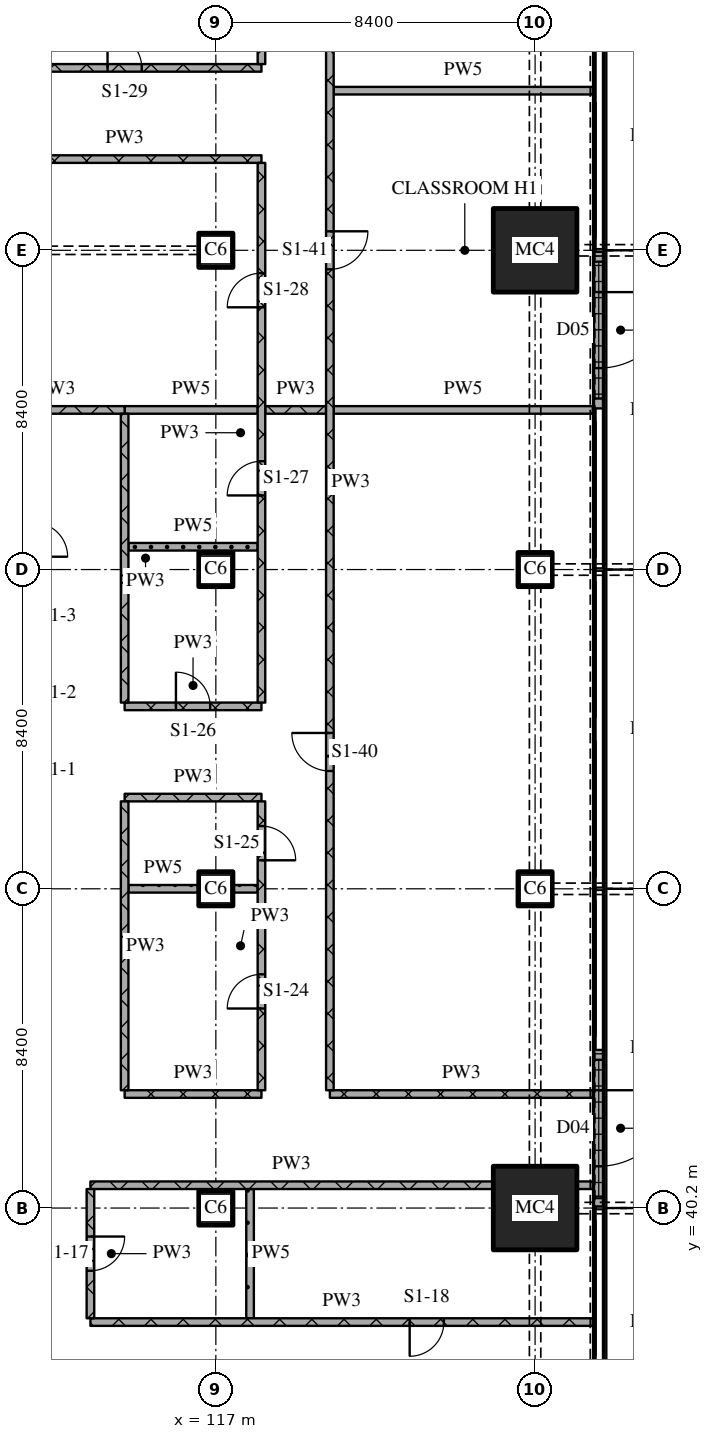
"""IFC4 building model, lengths in metres.
Left out: names, types, materials, properties, quantities, classifications, styles, units other than length and angle.
Written with IfcOpenShell. Run it as: python <this file> out.ifc"""

import sys

from ifc_helpers import new_model, si_unit, direction, frame, frame_2d, origin, origin_2d, place, context, subcontext, project, spatial, rectangle, extrude, element, fill, save


model = new_model("IFC4")
c1 = context("Model", 3, precision=1e-05, world=origin(), true_north=direction((0.0, 1.0)))
c2 = subcontext(c1, "Body", "Model", "MODEL_VIEW")
j1 = project(units=[si_unit("LENGTHUNIT", "METRE"), si_unit("PLANEANGLEUNIT", "RADIAN")], contexts=[c1])
p1 = place(None, origin())
s1 = spatial("IfcSite", under=j1, at=p1, CompositionType="ELEMENT")
p2 = place(p1, origin())
s2 = spatial("IfcBuilding", under=s1, at=p2, CompositionType="ELEMENT")
p3 = place(p2, frame((0.0, 0.0, 19.2)))
s3 = spatial("IfcBuildingStorey", under=s2, at=p3, CompositionType="ELEMENT", Elevation=19.2)
for number, where, z_axis, x_axis in (
    (1, (117.0, 40.2, 0.0), (0.0, 0.0, 1.0), (1.0, 0.0, 0.0)),
    (2, (117.0, 48.6, 0.0), (0.0, 0.0, 1.0), (1.0, 0.0, 0.0)),
    (3, (117.0, 57.0, 0.0), (0.0, 0.0, 1.0), (1.0, 0.0, 0.0)),
    (4, (117.0, 65.4, 0.0), (0.0, 0.0, 1.0), (1.0, 0.0, 0.0)),
):
    element("IfcColumn", number, at=place(p3, frame(where, z_axis=z_axis, x_axis=x_axis)), inside=s3, PredefinedType="COLUMN", context=c2, shape_type="SweptSolid", body=[
        extrude(rectangle(XDim=0.9, YDim=0.9, at=origin_2d()), origin(), (0.0, 0.0, 1.0), 4.5),
    ])
p4 = place(p3, frame((125.4, 40.2, 0.0), z_axis=(0.0, 0.0, 1.0), x_axis=(1.0, 0.0, 0.0)))
e5 = element("IfcColumn", 5, at=p4, inside=s3, PredefinedType="COLUMN", context=c2, shape_type="SweptSolid", body=[
    extrude(rectangle(XDim=2.2, YDim=2.2, at=origin_2d()), origin(), (0.0, 0.0, 1.0), 4.5),
])
for number, where, z_axis, x_axis in (
    (6, (125.4, 48.6, 0.0), (0.0, 0.0, 1.0), (1.0, 0.0, 0.0)),
    (7, (125.4, 57.0, 0.0), (0.0, 0.0, 1.0), (1.0, 0.0, 0.0)),
):
    element("IfcColumn", number, at=place(p3, frame(where, z_axis=z_axis, x_axis=x_axis)), inside=s3, PredefinedType="COLUMN", context=c2, shape_type="SweptSolid", body=[
        extrude(rectangle(XDim=0.9, YDim=0.9, at=origin_2d()), origin(), (0.0, 0.0, 1.0), 4.5),
    ])
p5 = place(p3, frame((125.4, 65.4, 0.0), z_axis=(0.0, 0.0, 1.0), x_axis=(1.0, 0.0, 0.0)))
e8 = element("IfcColumn", 8, at=p5, inside=s3, PredefinedType="COLUMN", context=c2, shape_type="SweptSolid", body=[
    extrude(rectangle(XDim=2.2, YDim=2.2, at=origin_2d()), origin(), (0.0, 0.0, 1.0), 4.5),
])
p6 = place(p3, frame((127.075, 44.36, 0.0), z_axis=(0.0, 0.0, 1.0), x_axis=(0.0, -1.0, 0.0)))
e9 = element("IfcWall", 9, at=p6, inside=s3, PredefinedType="SOLIDWALL", context=c2, shape_type="SweptSolid", body=[
    extrude(rectangle(XDim=4.12, YDim=0.25, at=frame_2d((2.06, 0.0))), origin(), (0.0, 0.0, 1.0), 4.2),
])
p7 = place(p6, frame((1.06, 0.0, 0.0)))
e10 = element("IfcOpeningElement", 10, at=p7, cuts=e9, PredefinedType="OPENING", context=c2, shape_type="SweptSolid", body=[
    extrude(rectangle(XDim=2.0, YDim=2.4, at=frame_2d((1.0, 1.2))), frame((0.0, 0.135, 0.0), z_axis=(0.0, -1.0, 0.0), x_axis=(1.0, 0.0, 0.0)), (0.0, 0.0, 1.0), 0.27),
])
p8 = place(p6, frame((0.26, 0.0, 2.7)))
e11 = element("IfcOpeningElement", 11, at=p8, cuts=e9, PredefinedType="OPENING", context=c2, shape_type="SweptSolid", body=[
    extrude(rectangle(XDim=3.6, YDim=1.1, at=frame_2d((1.8, 0.55))), frame((0.0, 0.135, 0.0), z_axis=(0.0, -1.0, 0.0), x_axis=(1.0, 0.0, 0.0)), (0.0, 0.0, 1.0), 0.27),
])
p9 = place(p3, frame((127.075, 65.36, 0.0), z_axis=(0.0, 0.0, 1.0), x_axis=(0.0, -1.0, 0.0)))
e12 = element("IfcWall", 12, at=p9, inside=s3, PredefinedType="SOLIDWALL", context=c2, shape_type="SweptSolid", body=[
    extrude(rectangle(XDim=4.12, YDim=0.25, at=frame_2d((2.06, 0.0))), origin(), (0.0, 0.0, 1.0), 4.2),
])
p10 = place(p9, frame((1.06, 0.0, 0.0)))
e13 = element("IfcOpeningElement", 13, at=p10, cuts=e12, PredefinedType="OPENING", context=c2, shape_type="SweptSolid", body=[
    extrude(rectangle(XDim=2.0, YDim=2.4, at=frame_2d((1.0, 1.2))), frame((0.0, 0.135, 0.0), z_axis=(0.0, -1.0, 0.0), x_axis=(1.0, 0.0, 0.0)), (0.0, 0.0, 1.0), 0.27),
])
p11 = place(p9, frame((0.26, 0.0, 2.7)))
e14 = element("IfcOpeningElement", 14, at=p11, cuts=e12, PredefinedType="OPENING", context=c2, shape_type="SweptSolid", body=[
    extrude(rectangle(XDim=3.6, YDim=1.1, at=frame_2d((1.8, 0.55))), frame((0.0, 0.135, 0.0), z_axis=(0.0, -1.0, 0.0), x_axis=(1.0, 0.0, 0.0)), (0.0, 0.0, 1.0), 0.27),
])
p12 = place(p3, frame((113.7, 37.2, 0.0), z_axis=(0.0, 0.0, 1.0), x_axis=(1.0, 0.0, 0.0)))
e15 = element("IfcWall", 15, at=p12, inside=s3, PredefinedType="PARTITIONING", context=c2, shape_type="SweptSolid", body=[
    extrude(rectangle(XDim=13.22, YDim=0.2, at=frame_2d((6.61, 0.0))), origin(), (0.0, 0.0, 1.0), 4.2),
])
p13 = place(p12, frame((8.4, 0.0, 0.0)))
e16 = element("IfcOpeningElement", 16, at=p13, cuts=e15, PredefinedType="OPENING", context=c2, shape_type="SweptSolid", body=[
    extrude(rectangle(XDim=0.9, YDim=2.1, at=frame_2d((0.45, 1.05))), frame((0.0, 0.11, 0.0), z_axis=(0.0, -1.0, 0.0), x_axis=(1.0, 0.0, 0.0)), (0.0, 0.0, 1.0), 0.22),
])
p14 = place(p3, frame((113.7, 40.8, 0.0), z_axis=(0.0, 0.0, 1.0), x_axis=(1.0, 0.0, 0.0)))
e17 = element("IfcWall", 17, at=p14, inside=s3, PredefinedType="PARTITIONING", context=c2, shape_type="SweptSolid", body=[
    extrude(rectangle(XDim=10.58, YDim=0.2, at=frame_2d((5.29, 0.0))), origin(), (0.0, 0.0, 1.0), 4.2),
])
p15 = place(p3, frame((126.52, 40.8, 0.0), z_axis=(0.0, 0.0, 1.0), x_axis=(1.0, 0.0, 0.0)))
e18 = element("IfcWall", 18, at=p15, inside=s3, PredefinedType="PARTITIONING", context=c2, shape_type="SweptSolid", body=[
    extrude(rectangle(XDim=0.4, YDim=0.2, at=frame_2d((0.2, 0.0))), origin(), (0.0, 0.0, 1.0), 4.2),
])
p16 = place(p3, frame((114.6, 43.2, 0.0), z_axis=(0.0, 0.0, 1.0), x_axis=(1.0, 0.0, 0.0)))
e19 = element("IfcWall", 19, at=p16, inside=s3, PredefinedType="PARTITIONING", context=c2, shape_type="SweptSolid", body=[
    extrude(rectangle(XDim=3.6, YDim=0.2, at=frame_2d((1.8, 0.0))), origin(), (0.0, 0.0, 1.0), 4.2),
])
p17 = place(p3, frame((120.0, 43.2, 0.0), z_axis=(0.0, 0.0, 1.0), x_axis=(1.0, 0.0, 0.0)))
e20 = element("IfcWall", 20, at=p17, inside=s3, PredefinedType="PARTITIONING", context=c2, shape_type="SweptSolid", body=[
    extrude(rectangle(XDim=6.92, YDim=0.2, at=frame_2d((3.46, 0.0))), origin(), (0.0, 0.0, 1.0), 4.2),
])
p18 = place(p3, frame((114.7, 48.6, 0.0), z_axis=(0.0, 0.0, 1.0), x_axis=(1.0, 0.0, 0.0)))
e21 = element("IfcWall", 21, at=p18, inside=s3, PredefinedType="PARTITIONING", context=c2, shape_type="SweptSolid", body=[
    extrude(rectangle(XDim=1.83, YDim=0.2, at=frame_2d((0.915, 0.0))), origin(), (0.0, 0.0, 1.0), 4.2),
])
p19 = place(p3, frame((117.47, 48.6, 0.0), z_axis=(0.0, 0.0, 1.0), x_axis=(1.0, 0.0, 0.0)))
e22 = element("IfcWall", 22, at=p19, inside=s3, PredefinedType="PARTITIONING", context=c2, shape_type="SweptSolid", body=[
    extrude(rectangle(XDim=0.63, YDim=0.2, at=frame_2d((0.315, 0.0))), origin(), (0.0, 0.0, 1.0), 4.2),
])
p20 = place(p3, frame((114.6, 51.0, 0.0), z_axis=(0.0, 0.0, 1.0), x_axis=(1.0, 0.0, 0.0)))
e23 = element("IfcWall", 23, at=p20, inside=s3, PredefinedType="PARTITIONING", context=c2, shape_type="SweptSolid", body=[
    extrude(rectangle(XDim=3.6, YDim=0.2, at=frame_2d((1.8, 0.0))), origin(), (0.0, 0.0, 1.0), 4.2),
])
p21 = place(p3, frame((114.6, 53.4, 0.0), z_axis=(0.0, 0.0, 1.0), x_axis=(1.0, 0.0, 0.0)))
e24 = element("IfcWall", 24, at=p21, inside=s3, PredefinedType="PARTITIONING", context=c2, shape_type="SweptSolid", body=[
    extrude(rectangle(XDim=3.6, YDim=0.2, at=frame_2d((1.8, 0.0))), origin(), (0.0, 0.0, 1.0), 4.2),
])
p22 = place(p21, frame((1.35, 0.0, 0.0)))
e25 = element("IfcOpeningElement", 25, at=p22, cuts=e24, PredefinedType="OPENING", context=c2, shape_type="SweptSolid", body=[
    extrude(rectangle(XDim=0.9, YDim=2.1, at=frame_2d((0.45, 1.05))), frame((0.0, 0.11, 0.0), z_axis=(0.0, -1.0, 0.0), x_axis=(1.0, 0.0, 0.0)), (0.0, 0.0, 1.0), 0.22),
])
p23 = place(p3, frame((114.7, 57.6, 0.0), z_axis=(0.0, 0.0, 1.0), x_axis=(1.0, 0.0, 0.0)))
e26 = element("IfcWall", 26, at=p23, inside=s3, PredefinedType="PARTITIONING", context=c2, shape_type="SweptSolid", body=[
    extrude(rectangle(XDim=3.4, YDim=0.2, at=frame_2d((1.7, 0.0))), origin(), (0.0, 0.0, 1.0), 4.2),
])
p24 = place(p3, frame((111.0, 61.2, 0.0), z_axis=(0.0, 0.0, 1.0), x_axis=(1.0, 0.0, 0.0)))
e27 = element("IfcWall", 27, at=p24, inside=s3, PredefinedType="PARTITIONING", context=c2, shape_type="SweptSolid", body=[
    extrude(rectangle(XDim=3.6, YDim=0.2, at=frame_2d((1.8, 0.0))), origin(), (0.0, 0.0, 1.0), 4.2),
])
p25 = place(p3, frame((118.3, 61.2, 0.0), z_axis=(0.0, 0.0, 1.0), x_axis=(1.0, 0.0, 0.0)))
e28 = element("IfcWall", 28, at=p25, inside=s3, PredefinedType="PARTITIONING", context=c2, shape_type="SweptSolid", body=[
    extrude(rectangle(XDim=1.6, YDim=0.2, at=frame_2d((0.8, 0.0))), origin(), (0.0, 0.0, 1.0), 4.2),
])
p26 = place(p3, frame((114.6, 61.2, 0.0), z_axis=(0.0, 0.0, 1.0), x_axis=(1.0, 0.0, 0.0)))
e29 = element("IfcWall", 29, at=p26, inside=s3, PredefinedType="PARTITIONING", context=c2, shape_type="SweptSolid", body=[
    extrude(rectangle(XDim=3.5, YDim=0.2, at=frame_2d((1.75, 0.0))), origin(), (0.0, 0.0, 1.0), 4.2),
])
p27 = place(p3, frame((120.1, 61.2, 0.0), z_axis=(0.0, 0.0, 1.0), x_axis=(1.0, 0.0, 0.0)))
e30 = element("IfcWall", 30, at=p27, inside=s3, PredefinedType="PARTITIONING", context=c2, shape_type="SweptSolid", body=[
    extrude(rectangle(XDim=6.82, YDim=0.2, at=frame_2d((3.41, 0.0))), origin(), (0.0, 0.0, 1.0), 4.2),
])
p28 = place(p3, frame((111.0, 67.8, 0.0), z_axis=(0.0, 0.0, 1.0), x_axis=(1.0, 0.0, 0.0)))
e31 = element("IfcWall", 31, at=p28, inside=s3, PredefinedType="PARTITIONING", context=c2, shape_type="SweptSolid", body=[
    extrude(rectangle(XDim=7.2, YDim=0.2, at=frame_2d((3.6, 0.0))), origin(), (0.0, 0.0, 1.0), 4.2),
])
p29 = place(p3, frame((120.1, 69.6, 0.0), z_axis=(0.0, 0.0, 1.0), x_axis=(1.0, 0.0, 0.0)))
e32 = element("IfcWall", 32, at=p29, inside=s3, PredefinedType="PARTITIONING", context=c2, shape_type="SweptSolid", body=[
    extrude(rectangle(XDim=6.82, YDim=0.2, at=frame_2d((3.41, 0.0))), origin(), (0.0, 0.0, 1.0), 4.2),
])
p30 = place(p3, frame((111.0, 70.2, 0.0), z_axis=(0.0, 0.0, 1.0), x_axis=(1.0, 0.0, 0.0)))
e33 = element("IfcWall", 33, at=p30, inside=s3, PredefinedType="PARTITIONING", context=c2, shape_type="SweptSolid", body=[
    extrude(rectangle(XDim=7.2, YDim=0.2, at=frame_2d((3.6, 0.0))), origin(), (0.0, 0.0, 1.0), 4.2),
])
p31 = place(p30, frame((3.15, 0.0, 0.0)))
e34 = element("IfcOpeningElement", 34, at=p31, cuts=e33, PredefinedType="OPENING", context=c2, shape_type="SweptSolid", body=[
    extrude(rectangle(XDim=0.9, YDim=2.1, at=frame_2d((0.45, 1.05))), frame((0.0, 0.11, 0.0), z_axis=(0.0, -1.0, 0.0), x_axis=(1.0, 0.0, 0.0)), (0.0, 0.0, 1.0), 0.22),
])
p32 = place(p3, frame((113.7, 40.7, 0.0), z_axis=(0.0, 0.0, 1.0), x_axis=(0.0, -1.0, 0.0)))
e35 = element("IfcWall", 35, at=p32, inside=s3, PredefinedType="PARTITIONING", context=c2, shape_type="SweptSolid", body=[
    extrude(rectangle(XDim=3.4, YDim=0.2, at=frame_2d((1.7, 0.0))), origin(), (0.0, 0.0, 1.0), 4.2),
])
p33 = place(p32, frame((1.25, 0.0, 0.0)))
e36 = element("IfcOpeningElement", 36, at=p33, cuts=e35, PredefinedType="OPENING", context=c2, shape_type="SweptSolid", body=[
    extrude(rectangle(XDim=0.9, YDim=2.1, at=frame_2d((0.45, 1.05))), frame((0.0, 0.11, 0.0), z_axis=(0.0, -1.0, 0.0), x_axis=(1.0, 0.0, 0.0)), (0.0, 0.0, 1.0), 0.22),
])
p34 = place(p3, frame((114.6, 50.9, 0.0), z_axis=(0.0, 0.0, 1.0), x_axis=(0.0, -1.0, 0.0)))
e37 = element("IfcWall", 37, at=p34, inside=s3, PredefinedType="PARTITIONING", context=c2, shape_type="SweptSolid", body=[
    extrude(rectangle(XDim=7.6, YDim=0.2, at=frame_2d((3.8, 0.0))), origin(), (0.0, 0.0, 1.0), 4.2),
])
p35 = place(p3, frame((114.6, 61.1, 0.0), z_axis=(0.0, 0.0, 1.0), x_axis=(0.0, -1.0, 0.0)))
e38 = element("IfcWall", 38, at=p35, inside=s3, PredefinedType="PARTITIONING", context=c2, shape_type="SweptSolid", body=[
    extrude(rectangle(XDim=7.6, YDim=0.2, at=frame_2d((3.8, 0.0))), origin(), (0.0, 0.0, 1.0), 4.2),
])
p36 = place(p3, frame((117.9, 40.7, 0.0), z_axis=(0.0, 0.0, 1.0), x_axis=(0.0, -1.0, 0.0)))
e39 = element("IfcWall", 39, at=p36, inside=s3, PredefinedType="PARTITIONING", context=c2, shape_type="SweptSolid", body=[
    extrude(rectangle(XDim=3.4, YDim=0.2, at=frame_2d((1.7, 0.0))), origin(), (0.0, 0.0, 1.0), 4.2),
])
p37 = place(p3, frame((118.2, 43.3, 0.0), z_axis=(0.0, 0.0, 1.0), x_axis=(0.0, 1.0, 0.0)))
e40 = element("IfcWall", 40, at=p37, inside=s3, PredefinedType="PARTITIONING", context=c2, shape_type="SweptSolid", body=[
    extrude(rectangle(XDim=7.6, YDim=0.2, at=frame_2d((3.8, 0.0))), origin(), (0.0, 0.0, 1.0), 4.2),
])
p38 = place(p37, frame((2.15, 0.0, 0.0)))
e41 = element("IfcOpeningElement", 41, at=p38, cuts=e40, PredefinedType="OPENING", context=c2, shape_type="SweptSolid", body=[
    extrude(rectangle(XDim=0.9, YDim=2.1, at=frame_2d((0.45, 1.05))), frame((0.0, 0.11, 0.0), z_axis=(0.0, -1.0, 0.0), x_axis=(1.0, 0.0, 0.0)), (0.0, 0.0, 1.0), 0.22),
])
p39 = place(p37, frame((6.05, 0.0, 0.0)))
e42 = element("IfcOpeningElement", 42, at=p39, cuts=e40, PredefinedType="OPENING", context=c2, shape_type="SweptSolid", body=[
    extrude(rectangle(XDim=0.9, YDim=2.1, at=frame_2d((0.45, 1.05))), frame((0.0, 0.11, 0.0), z_axis=(0.0, -1.0, 0.0), x_axis=(1.0, 0.0, 0.0)), (0.0, 0.0, 1.0), 0.22),
])
p40 = place(p3, frame((118.2, 53.5, 0.0), z_axis=(0.0, 0.0, 1.0), x_axis=(0.0, 1.0, 0.0)))
e43 = element("IfcWall", 43, at=p40, inside=s3, PredefinedType="PARTITIONING", context=c2, shape_type="SweptSolid", body=[
    extrude(rectangle(XDim=14.2, YDim=0.2, at=frame_2d((7.1, 0.0))), origin(), (0.0, 0.0, 1.0), 4.2),
])
p41 = place(p40, frame((5.45, 0.0, 0.0)))
e44 = element("IfcOpeningElement", 44, at=p41, cuts=e43, PredefinedType="OPENING", context=c2, shape_type="SweptSolid", body=[
    extrude(rectangle(XDim=0.9, YDim=2.1, at=frame_2d((0.45, 1.05))), frame((0.0, 0.11, 0.0), z_axis=(0.0, -1.0, 0.0), x_axis=(1.0, 0.0, 0.0)), (0.0, 0.0, 1.0), 0.22),
])
p42 = place(p40, frame((10.4, 0.0, 0.0)))
e45 = element("IfcOpeningElement", 45, at=p42, cuts=e43, PredefinedType="OPENING", context=c2, shape_type="SweptSolid", body=[
    extrude(rectangle(XDim=0.9, YDim=2.1, at=frame_2d((0.45, 1.05))), frame((0.0, 0.11, 0.0), z_axis=(0.0, -1.0, 0.0), x_axis=(1.0, 0.0, 0.0)), (0.0, 0.0, 1.0), 0.22),
])
p43 = place(p3, frame((118.2, 75.32, 0.0), z_axis=(0.0, 0.0, 1.0), x_axis=(0.0, -1.0, 0.0)))
e46 = element("IfcWall", 46, at=p43, inside=s3, PredefinedType="PARTITIONING", context=c2, shape_type="SweptSolid", body=[
    extrude(rectangle(XDim=5.02, YDim=0.2, at=frame_2d((2.51, 0.0))), origin(), (0.0, 0.0, 1.0), 4.2),
])
p44 = place(p3, frame((120.0, 75.32, 0.0), z_axis=(0.0, 0.0, 1.0), x_axis=(0.0, -1.0, 0.0)))
e47 = element("IfcWall", 47, at=p44, inside=s3, PredefinedType="PARTITIONING", context=c2, shape_type="SweptSolid", body=[
    extrude(rectangle(XDim=32.02, YDim=0.2, at=frame_2d((16.01, 0.0))), origin(), (0.0, 0.0, 1.0), 4.2),
])
p45 = place(p44, frame((2.841, 0.0, 0.0)))
e48 = element("IfcOpeningElement", 48, at=p45, cuts=e47, PredefinedType="OPENING", context=c2, shape_type="SweptSolid", body=[
    extrude(rectangle(XDim=1.0, YDim=2.1, at=frame_2d((0.5, 1.05))), frame((0.0, 0.11, 0.0), z_axis=(0.0, -1.0, 0.0), x_axis=(1.0, 0.0, 0.0)), (0.0, 0.0, 1.0), 0.22),
])
p46 = place(p44, frame((9.42, 0.0, 0.0)))
e49 = element("IfcOpeningElement", 49, at=p46, cuts=e47, PredefinedType="OPENING", context=c2, shape_type="SweptSolid", body=[
    extrude(rectangle(XDim=1.0, YDim=2.1, at=frame_2d((0.5, 1.05))), frame((0.0, 0.11, 0.0), z_axis=(0.0, -1.0, 0.0), x_axis=(1.0, 0.0, 0.0)), (0.0, 0.0, 1.0), 0.22),
])
p47 = place(p44, frame((22.62, 0.0, 0.0)))
e50 = element("IfcOpeningElement", 50, at=p47, cuts=e47, PredefinedType="OPENING", context=c2, shape_type="SweptSolid", body=[
    extrude(rectangle(XDim=1.0, YDim=2.1, at=frame_2d((0.5, 1.05))), frame((0.0, 0.11, 0.0), z_axis=(0.0, -1.0, 0.0), x_axis=(1.0, 0.0, 0.0)), (0.0, 0.0, 1.0), 0.22),
])
p48 = place(p7, origin())
e51 = element("IfcDoor", 51, at=p48, inside=s3, OperationType="DOUBLE_DOOR_SINGLE_SWING", PredefinedType="DOOR", context=c2, shape_type="SweptSolid", body=[
    extrude(rectangle(XDim=2.0, YDim=2.4, at=frame_2d((1.0, 1.2))), frame((0.0, 0.025, 0.0), z_axis=(0.0, -1.0, 0.0), x_axis=(1.0, 0.0, 0.0)), (0.0, 0.0, 1.0), 0.05),
])
fill(e10, e51)
p49 = place(p8, origin())
e52 = element("IfcWindow", 52, at=p49, inside=s3, PartitioningType="SINGLE_PANEL", PredefinedType="WINDOW", context=c2, shape_type="SweptSolid", body=[
    extrude(rectangle(XDim=3.6, YDim=1.1, at=frame_2d((1.8, 0.55))), frame((0.0, 0.03, 0.0), z_axis=(0.0, -1.0, 0.0), x_axis=(1.0, 0.0, 0.0)), (0.0, 0.0, 1.0), 0.06),
])
fill(e11, e52)
p50 = place(p10, origin())
e53 = element("IfcDoor", 53, at=p50, inside=s3, OperationType="DOUBLE_DOOR_SINGLE_SWING", PredefinedType="DOOR", context=c2, shape_type="SweptSolid", body=[
    extrude(rectangle(XDim=2.0, YDim=2.4, at=frame_2d((1.0, 1.2))), frame((0.0, 0.025, 0.0), z_axis=(0.0, -1.0, 0.0), x_axis=(1.0, 0.0, 0.0)), (0.0, 0.0, 1.0), 0.05),
])
fill(e13, e53)
p51 = place(p11, origin())
e54 = element("IfcWindow", 54, at=p51, inside=s3, PartitioningType="SINGLE_PANEL", PredefinedType="WINDOW", context=c2, shape_type="SweptSolid", body=[
    extrude(rectangle(XDim=3.6, YDim=1.1, at=frame_2d((1.8, 0.55))), frame((0.0, 0.03, 0.0), z_axis=(0.0, -1.0, 0.0), x_axis=(1.0, 0.0, 0.0)), (0.0, 0.0, 1.0), 0.06),
])
fill(e14, e54)
p52 = place(p13, origin())
e55 = element("IfcDoor", 55, at=p52, inside=s3, OperationType="SINGLE_SWING_RIGHT", PredefinedType="DOOR", context=c2, shape_type="SweptSolid", body=[
    extrude(rectangle(XDim=0.9, YDim=2.1, at=frame_2d((0.45, 1.05))), frame((0.0, 0.025, 0.0), z_axis=(0.0, -1.0, 0.0), x_axis=(1.0, 0.0, 0.0)), (0.0, 0.0, 1.0), 0.05),
])
fill(e16, e55)
p53 = place(p22, origin())
e56 = element("IfcDoor", 56, at=p53, inside=s3, OperationType="SINGLE_SWING_LEFT", PredefinedType="DOOR", context=c2, shape_type="SweptSolid", body=[
    extrude(rectangle(XDim=0.9, YDim=2.1, at=frame_2d((0.45, 1.05))), frame((0.0, 0.025, 0.0), z_axis=(0.0, -1.0, 0.0), x_axis=(1.0, 0.0, 0.0)), (0.0, 0.0, 1.0), 0.05),
])
fill(e25, e56)
p54 = place(p31, origin())
e57 = element("IfcDoor", 57, at=p54, inside=s3, OperationType="SINGLE_SWING_LEFT", PredefinedType="DOOR", context=c2, shape_type="SweptSolid", body=[
    extrude(rectangle(XDim=0.9, YDim=2.1, at=frame_2d((0.45, 1.05))), frame((0.0, 0.025, 0.0), z_axis=(0.0, -1.0, 0.0), x_axis=(1.0, 0.0, 0.0)), (0.0, 0.0, 1.0), 0.05),
])
fill(e34, e57)
p55 = place(p33, origin())
e58 = element("IfcDoor", 58, at=p55, inside=s3, OperationType="SINGLE_SWING_LEFT", PredefinedType="DOOR", context=c2, shape_type="SweptSolid", body=[
    extrude(rectangle(XDim=0.9, YDim=2.1, at=frame_2d((0.45, 1.05))), frame((0.0, 0.025, 0.0), z_axis=(0.0, -1.0, 0.0), x_axis=(1.0, 0.0, 0.0)), (0.0, 0.0, 1.0), 0.05),
])
fill(e36, e58)
p56 = place(p38, origin())
e59 = element("IfcDoor", 59, at=p56, inside=s3, OperationType="SINGLE_SWING_LEFT", PredefinedType="DOOR", context=c2, shape_type="SweptSolid", body=[
    extrude(rectangle(XDim=0.9, YDim=2.1, at=frame_2d((0.45, 1.05))), frame((0.0, 0.025, 0.0), z_axis=(0.0, -1.0, 0.0), x_axis=(1.0, 0.0, 0.0)), (0.0, 0.0, 1.0), 0.05),
])
fill(e41, e59)
p57 = place(p39, origin())
e60 = element("IfcDoor", 60, at=p57, inside=s3, OperationType="SINGLE_SWING_RIGHT", PredefinedType="DOOR", context=c2, shape_type="SweptSolid", body=[
    extrude(rectangle(XDim=0.9, YDim=2.1, at=frame_2d((0.45, 1.05))), frame((0.0, 0.025, 0.0), z_axis=(0.0, -1.0, 0.0), x_axis=(1.0, 0.0, 0.0)), (0.0, 0.0, 1.0), 0.05),
])
fill(e42, e60)
p58 = place(p41, origin())
e61 = element("IfcDoor", 61, at=p58, inside=s3, OperationType="SINGLE_SWING_LEFT", PredefinedType="DOOR", context=c2, shape_type="SweptSolid", body=[
    extrude(rectangle(XDim=0.9, YDim=2.1, at=frame_2d((0.45, 1.05))), frame((0.0, 0.025, 0.0), z_axis=(0.0, -1.0, 0.0), x_axis=(1.0, 0.0, 0.0)), (0.0, 0.0, 1.0), 0.05),
])
fill(e44, e61)
p59 = place(p42, origin())
e62 = element("IfcDoor", 62, at=p59, inside=s3, OperationType="SINGLE_SWING_LEFT", PredefinedType="DOOR", context=c2, shape_type="SweptSolid", body=[
    extrude(rectangle(XDim=0.9, YDim=2.1, at=frame_2d((0.45, 1.05))), frame((0.0, 0.025, 0.0), z_axis=(0.0, -1.0, 0.0), x_axis=(1.0, 0.0, 0.0)), (0.0, 0.0, 1.0), 0.05),
])
fill(e45, e62)
p60 = place(p46, origin())
e63 = element("IfcDoor", 63, at=p60, inside=s3, OperationType="SINGLE_SWING_LEFT", PredefinedType="DOOR", context=c2, shape_type="SweptSolid", body=[
    extrude(rectangle(XDim=1.0, YDim=2.1, at=frame_2d((0.5, 1.05))), frame((0.0, 0.025, 0.0), z_axis=(0.0, -1.0, 0.0), x_axis=(1.0, 0.0, 0.0)), (0.0, 0.0, 1.0), 0.05),
])
fill(e49, e63)
p61 = place(p47, origin())
e64 = element("IfcDoor", 64, at=p61, inside=s3, OperationType="SINGLE_SWING_RIGHT", PredefinedType="DOOR", context=c2, shape_type="SweptSolid", body=[
    extrude(rectangle(XDim=1.0, YDim=2.1, at=frame_2d((0.5, 1.05))), frame((0.0, 0.025, 0.0), z_axis=(0.0, -1.0, 0.0), x_axis=(1.0, 0.0, 0.0)), (0.0, 0.0, 1.0), 0.05),
])
fill(e50, e64)
save(model, sys.argv[1])
